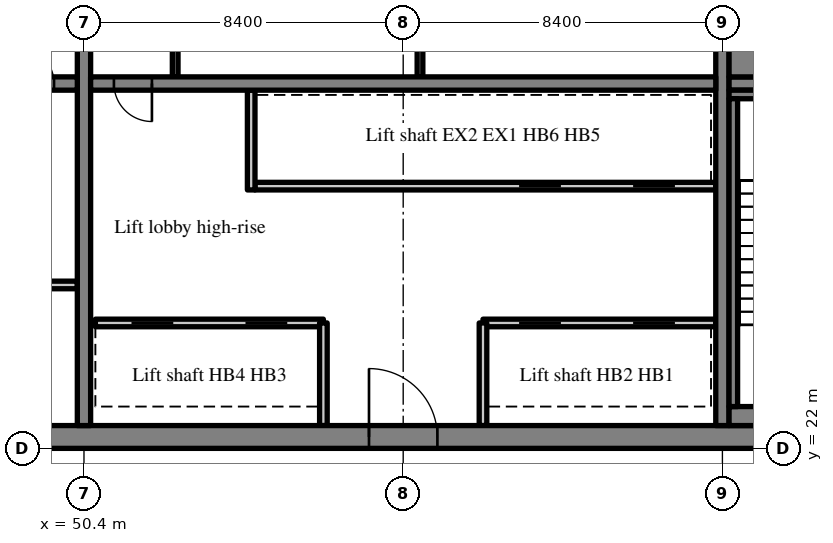
"""IFC4 building model, lengths in metres.
Left out: names, types, materials, properties, quantities, classifications, styles, units other than length and angle.
Written with IfcOpenShell. Run it as: python <this file> out.ifc"""

import sys

from ifc_helpers import new_model, si_unit, direction, frame, frame_2d, origin, place, context, subcontext, project, spatial, rectangle, extrude, source, transform, mapped, element, fill, save


model = new_model("IFC4")
c1 = context("Model", 3, precision=1e-05, world=origin(), true_north=direction((0.0, 1.0)))
c2 = subcontext(c1, "Body", "Model", "MODEL_VIEW")
j1 = project(units=[si_unit("LENGTHUNIT", "METRE"), si_unit("PLANEANGLEUNIT", "RADIAN")], contexts=[c1])
p1 = place(None, origin())
s1 = spatial("IfcSite", under=j1, at=p1, CompositionType="ELEMENT")
p2 = place(p1, origin())
s2 = spatial("IfcBuilding", under=s1, at=p2, CompositionType="ELEMENT")
p3 = place(p2, frame((0.0, 0.0, 249.1)))
s3 = spatial("IfcBuildingStorey", under=s2, at=p3, CompositionType="ELEMENT", Elevation=249.1)
m1 = source(origin(), c2, "Body", "SweptSolid", [
    extrude(rectangle(XDim=50.4, YDim=0.6, at=frame_2d((25.2, 0.0))), origin(), (0.0, 0.0, 1.0), 3.62),
])
p4 = place(p3, frame((25.2, 22.3, 0.0), z_axis=(0.0, 0.0, 1.0), x_axis=(1.0, 0.0, 0.0)))
e1 = element("IfcWall", 1, at=p4, inside=s3, PredefinedType="SHEAR", context=c2, shape_type="MappedRepresentation", body=[
    mapped(m1, transform((0.0, 0.0, 0.0), scale=1.0)),
])
m2 = source(origin(), c2, "Body", "SweptSolid", [
    extrude(rectangle(XDim=1.8, YDim=2.1, at=frame_2d((0.9, 1.05))), frame((0.0, 0.31, 0.0), z_axis=(0.0, -1.0, 0.0), x_axis=(1.0, 0.0, 0.0)), (0.0, 0.0, 1.0), 0.62),
])
p5 = place(p4, frame((15.9, 0.0, 0.0)))
e2 = element("IfcOpeningElement", 2, at=p5, cuts=e1, PredefinedType="OPENING", context=c2, shape_type="MappedRepresentation", body=[
    mapped(m2, transform((0.0, 0.0, 0.0), scale=1.0)),
])
m3 = source(origin(), c2, "Body", "SweptSolid", [
    extrude(rectangle(XDim=0.9, YDim=2.1, at=frame_2d((0.45, 1.05))), frame((0.0, 0.31, 0.0), z_axis=(0.0, -1.0, 0.0), x_axis=(1.0, 0.0, 0.0)), (0.0, 0.0, 1.0), 0.62),
])
p6 = place(p4, frame((21.513, 0.0, 0.0)))
e3 = element("IfcOpeningElement", 3, at=p6, cuts=e1, PredefinedType="OPENING", context=c2, shape_type="MappedRepresentation", body=[
    mapped(m3, transform((0.0, 0.0, 0.0), scale=1.0)),
])
p7 = place(p4, frame((32.7, 0.0, 0.0)))
e4 = element("IfcOpeningElement", 4, at=p7, cuts=e1, PredefinedType="OPENING", context=c2, shape_type="MappedRepresentation", body=[
    mapped(m2, transform((0.0, 0.0, 0.0), scale=1.0)),
])
m4 = source(origin(), c2, "Body", "SweptSolid", [
    extrude(rectangle(XDim=1.2, YDim=2.1, at=frame_2d((0.6, 1.05))), frame((0.0, 0.31, 0.0), z_axis=(0.0, -1.0, 0.0), x_axis=(1.0, 0.0, 0.0)), (0.0, 0.0, 1.0), 0.62),
])
p8 = place(p4, frame((6.488, 0.0, 0.0)))
e5 = element("IfcOpeningElement", 5, at=p8, cuts=e1, PredefinedType="OPENING", context=c2, shape_type="MappedRepresentation", body=[
    mapped(m4, transform((0.0, 0.0, 0.0), scale=1.0)),
])
p9 = place(p4, frame((47.925, 0.0, 0.0)))
e6 = element("IfcOpeningElement", 6, at=p9, cuts=e1, PredefinedType="OPENING", context=c2, shape_type="MappedRepresentation", body=[
    mapped(m4, transform((0.0, 0.0, 0.0), scale=1.0)),
])
m5 = source(origin(), c2, "Body", "SweptSolid", [
    extrude(rectangle(XDim=18.8, YDim=0.35, at=frame_2d((9.4, 0.0))), origin(), (0.0, 0.0, 1.0), 3.62),
])
p10 = place(p3, frame((50.4, 22.6, 0.0), z_axis=(0.0, 0.0, 1.0), x_axis=(0.0, 1.0, 0.0)))
e7 = element("IfcWall", 7, at=p10, inside=s3, PredefinedType="SHEAR", context=c2, shape_type="MappedRepresentation", body=[
    mapped(m5, transform((0.0, 0.0, 0.0), scale=1.0)),
])
m6 = source(origin(), c2, "Body", "SweptSolid", [
    extrude(rectangle(XDim=1.1, YDim=2.1, at=frame_2d((0.55, 1.05))), frame((0.0, 0.185, 0.0), z_axis=(0.0, -1.0, 0.0), x_axis=(1.0, 0.0, 0.0)), (0.0, 0.0, 1.0), 0.37),
])
p11 = place(p10, frame((12.85, 0.0, 0.0)))
e8 = element("IfcOpeningElement", 8, at=p11, cuts=e7, PredefinedType="OPENING", context=c2, shape_type="MappedRepresentation", body=[
    mapped(m6, transform((0.0, 0.0, 0.0), scale=1.0)),
])
p12 = place(p3, frame((67.2, 22.6, 0.0), z_axis=(0.0, 0.0, 1.0), x_axis=(0.0, 1.0, 0.0)))
e9 = element("IfcWall", 9, at=p12, inside=s3, PredefinedType="SHEAR", context=c2, shape_type="MappedRepresentation", body=[
    mapped(m5, transform((0.0, 0.0, 0.0), scale=1.0)),
])
m7 = source(origin(), c2, "Body", "SweptSolid", [
    extrude(rectangle(XDim=16.45, YDim=0.35, at=frame_2d((8.225, 0.0))), origin(), (0.0, 0.0, 1.0), 3.62),
])
p13 = place(p3, frame((33.775, 31.6, 0.0), z_axis=(0.0, 0.0, 1.0), x_axis=(1.0, 0.0, 0.0)))
e10 = element("IfcWall", 10, at=p13, inside=s3, PredefinedType="SHEAR", context=c2, shape_type="MappedRepresentation", body=[
    mapped(m7, transform((0.0, 0.0, 0.0), scale=1.0)),
])
m8 = source(origin(), c2, "Body", "SweptSolid", [
    extrude(rectangle(XDim=1.0, YDim=2.1, at=frame_2d((0.5, 1.05))), frame((0.0, 0.185, 0.0), z_axis=(0.0, -1.0, 0.0), x_axis=(1.0, 0.0, 0.0)), (0.0, 0.0, 1.0), 0.37),
])
p14 = place(p13, frame((14.837, 0.0, 0.0)))
e11 = element("IfcOpeningElement", 11, at=p14, cuts=e10, PredefinedType="OPENING", context=c2, shape_type="MappedRepresentation", body=[
    mapped(m8, transform((0.0, 0.0, 0.0), scale=1.0)),
])
m9 = source(origin(), c2, "Body", "SweptSolid", [
    extrude(rectangle(XDim=16.45, YDim=0.35, at=frame_2d((8.225, 0.0))), origin(), (0.0, 0.0, 1.0), 3.62),
])
p15 = place(p3, frame((50.575, 31.6, 0.0), z_axis=(0.0, 0.0, 1.0), x_axis=(1.0, 0.0, 0.0)))
e12 = element("IfcWall", 12, at=p15, inside=s3, PredefinedType="SHEAR", context=c2, shape_type="MappedRepresentation", body=[
    mapped(m9, transform((0.0, 0.0, 0.0), scale=1.0)),
])
p16 = place(p15, frame((0.613, 0.0, 0.0)))
e13 = element("IfcOpeningElement", 13, at=p16, cuts=e12, PredefinedType="OPENING", context=c2, shape_type="MappedRepresentation", body=[
    mapped(m8, transform((0.0, 0.0, 0.0), scale=1.0)),
])
m10 = source(origin(), c2, "Body", "SweptSolid", [
    extrude(rectangle(XDim=7.625, YDim=0.35, at=frame_2d((3.812, 0.0))), origin(), (0.0, 0.0, 1.0), 3.62),
])
p17 = place(p3, frame((67.375, 31.6, 0.0), z_axis=(0.0, 0.0, 1.0), x_axis=(1.0, 0.0, 0.0)))
e14 = element("IfcWall", 14, at=p17, inside=s3, PredefinedType="SHEAR", context=c2, shape_type="MappedRepresentation", body=[
    mapped(m10, transform((0.0, 0.0, 0.0), scale=1.0)),
])
p18 = place(p17, frame((5.8, 0.0, 0.0)))
e15 = element("IfcOpeningElement", 15, at=p18, cuts=e14, PredefinedType="OPENING", context=c2, shape_type="MappedRepresentation", body=[
    mapped(m6, transform((0.0, 0.0, 0.0), scale=1.0)),
])
m11 = source(origin(), c2, "Body", "SweptSolid", [
    extrude(rectangle(XDim=6.125, YDim=0.2, at=frame_2d((3.062, 0.0))), origin(), (0.0, 0.0, 1.0), 3.62),
])
p19 = place(p3, frame((44.1, 26.3, 0.0), z_axis=(0.0, 0.0, 1.0), x_axis=(1.0, 0.0, 0.0)))
e16 = element("IfcWall", 16, at=p19, inside=s3, PredefinedType="PARTITIONING", context=c2, shape_type="MappedRepresentation", body=[
    mapped(m11, transform((0.0, 0.0, 0.0), scale=1.0)),
])
p20 = place(p3, frame((67.025, 25.3, 0.0), z_axis=(0.0, 0.0, 1.0), x_axis=(-1.0, 0.0, 0.0)))
e17 = element("IfcWall", 17, at=p20, inside=s3, PredefinedType="SOLIDWALL", context=c2, shape_type="MappedRepresentation", body=[
    mapped(m11, transform((0.0, 0.0, 0.0), scale=1.0)),
])
m12 = source(origin(), c2, "Body", "SweptSolid", [
    extrude(rectangle(XDim=1.1, YDim=2.1, at=frame_2d((0.55, 1.05))), frame((0.0, 0.11, 0.0), z_axis=(0.0, -1.0, 0.0), x_axis=(1.0, 0.0, 0.0)), (0.0, 0.0, 1.0), 0.22),
])
p21 = place(p20, frame((1.075, 0.0, 0.0)))
e18 = element("IfcOpeningElement", 18, at=p21, cuts=e17, PredefinedType="OPENING", context=c2, shape_type="MappedRepresentation", body=[
    mapped(m12, transform((0.0, 0.0, 0.0), scale=1.0)),
])
p22 = place(p20, frame((4.075, 0.0, 0.0)))
e19 = element("IfcOpeningElement", 19, at=p22, cuts=e17, PredefinedType="OPENING", context=c2, shape_type="MappedRepresentation", body=[
    mapped(m12, transform((0.0, 0.0, 0.0), scale=1.0)),
])
m13 = source(origin(), c2, "Body", "SweptSolid", [
    extrude(rectangle(XDim=6.0, YDim=0.2, at=frame_2d((3.0, 0.0))), origin(), (0.0, 0.0, 1.0), 3.62),
])
p23 = place(p3, frame((56.7, 25.3, 0.0), z_axis=(0.0, 0.0, 1.0), x_axis=(-1.0, 0.0, 0.0)))
e20 = element("IfcWall", 20, at=p23, inside=s3, PredefinedType="SOLIDWALL", context=c2, shape_type="MappedRepresentation", body=[
    mapped(m13, transform((0.0, 0.0, 0.0), scale=1.0)),
])
p24 = place(p23, frame((0.95, 0.0, 0.0)))
e21 = element("IfcOpeningElement", 21, at=p24, cuts=e20, PredefinedType="OPENING", context=c2, shape_type="MappedRepresentation", body=[
    mapped(m12, transform((0.0, 0.0, 0.0), scale=1.0)),
])
p25 = place(p23, frame((3.95, 0.0, 0.0)))
e22 = element("IfcOpeningElement", 22, at=p25, cuts=e20, PredefinedType="OPENING", context=c2, shape_type="MappedRepresentation", body=[
    mapped(m12, transform((0.0, 0.0, 0.0), scale=1.0)),
])
m14 = source(origin(), c2, "Body", "SweptSolid", [
    extrude(rectangle(XDim=12.125, YDim=0.2, at=frame_2d((6.062, 0.0))), origin(), (0.0, 0.0, 1.0), 3.62),
])
p26 = place(p3, frame((67.025, 28.9, 0.0), z_axis=(0.0, 0.0, 1.0), x_axis=(-1.0, 0.0, 0.0)))
e23 = element("IfcWall", 23, at=p26, inside=s3, PredefinedType="SOLIDWALL", context=c2, shape_type="MappedRepresentation", body=[
    mapped(m14, transform((0.0, 0.0, 0.0), scale=1.0)),
])
p27 = place(p26, frame((1.075, 0.0, 0.0)))
e24 = element("IfcOpeningElement", 24, at=p27, cuts=e23, PredefinedType="OPENING", context=c2, shape_type="MappedRepresentation", body=[
    mapped(m12, transform((0.0, 0.0, 0.0), scale=1.0)),
])
p28 = place(p26, frame((4.075, 0.0, 0.0)))
e25 = element("IfcOpeningElement", 25, at=p28, cuts=e23, PredefinedType="OPENING", context=c2, shape_type="MappedRepresentation", body=[
    mapped(m12, transform((0.0, 0.0, 0.0), scale=1.0)),
])
m15 = source(origin(), c2, "Body", "SweptSolid", [
    extrude(rectangle(XDim=2.7, YDim=0.2, at=frame_2d((1.35, 0.0))), origin(), (0.0, 0.0, 1.0), 3.62),
])
for number, where, z_axis, x_axis in (
    (26, (60.9, 22.6, 0.0), (0.0, 0.0, 1.0), (0.0, 1.0, 0.0)),
    (27, (56.7, 22.6, 0.0), (0.0, 0.0, 1.0), (0.0, 1.0, 0.0)),
):
    element("IfcWall", number, at=place(p3, frame(where, z_axis=z_axis, x_axis=x_axis)), inside=s3, PredefinedType="SOLIDWALL", context=c2, shape_type="MappedRepresentation", body=[
        mapped(m15, transform((0.0, 0.0, 0.0), scale=1.0)),
    ])
m16 = source(origin(), c2, "Body", "SweptSolid", [
    extrude(rectangle(XDim=2.625, YDim=0.2, at=frame_2d((1.312, 0.0))), origin(), (0.0, 0.0, 1.0), 3.62),
])
p29 = place(p3, frame((54.8, 28.8, 0.0), z_axis=(0.0, 0.0, 1.0), x_axis=(0.0, 1.0, 0.0)))
e28 = element("IfcWall", 28, at=p29, inside=s3, PredefinedType="SOLIDWALL", context=c2, shape_type="MappedRepresentation", body=[
    mapped(m16, transform((0.0, 0.0, 0.0), scale=1.0)),
])
m17 = source(origin(), c2, "Body", "SweptSolid", [
    extrude(rectangle(XDim=3.225, YDim=0.15, at=frame_2d((1.613, 0.0))), origin(), (0.0, 0.0, 1.0), 3.62),
])
for number, where, z_axis, x_axis in (
    (29, (52.8, 31.775, 0.0), (0.0, 0.0, 1.0), (0.0, 1.0, 0.0)),
    (30, (59.242, 31.775, 0.0), (0.0, 0.0, 1.0), (0.0, 1.0, 0.0)),
):
    element("IfcWall", number, at=place(p3, frame(where, z_axis=z_axis, x_axis=x_axis)), inside=s3, PredefinedType="PARTITIONING", context=c2, shape_type="MappedRepresentation", body=[
        mapped(m17, transform((0.0, 0.0, 0.0), scale=1.0)),
    ])
m18 = source(origin(), c2, "Body", "SweptSolid", [
    extrude(rectangle(XDim=4.875, YDim=0.5, at=frame_2d((2.438, 0.0))), origin(), (0.0, 0.0, 1.0), 3.62),
])
p30 = place(p3, frame((67.375, 22.85, 0.0), z_axis=(0.0, 0.0, 1.0), x_axis=(1.0, 0.0, 0.0)))
e31 = element("IfcWall", 31, at=p30, inside=s3, PredefinedType="SOLIDWALL", context=c2, shape_type="MappedRepresentation", body=[
    mapped(m18, transform((0.0, 0.0, 0.0), scale=1.0)),
])
m19 = source(origin(), c2, "Body", "SweptSolid", [
    extrude(rectangle(XDim=4.875, YDim=0.225, at=frame_2d((2.438, 0.0))), origin(), (0.0, 0.0, 1.0), 3.62),
])
p31 = place(p3, frame((67.375, 31.312, 0.0), z_axis=(0.0, 0.0, 1.0), x_axis=(1.0, 0.0, 0.0)))
e32 = element("IfcWall", 32, at=p31, inside=s3, PredefinedType="SOLIDWALL", context=c2, shape_type="MappedRepresentation", body=[
    mapped(m19, transform((0.0, 0.0, 0.0), scale=1.0)),
])
m20 = source(origin(), c2, "Body", "SweptSolid", [
    extrude(rectangle(XDim=8.1, YDim=0.225, at=frame_2d((4.05, 0.0))), origin(), (0.0, 0.0, 1.0), 3.62),
])
p32 = place(p3, frame((67.487, 23.1, 0.0), z_axis=(0.0, 0.0, 1.0), x_axis=(0.0, 1.0, 0.0)))
e33 = element("IfcWall", 33, at=p32, inside=s3, PredefinedType="SOLIDWALL", context=c2, shape_type="MappedRepresentation", body=[
    mapped(m20, transform((0.0, 0.0, 0.0), scale=1.0)),
])
m21 = source(origin(), c2, "Body", "SweptSolid", [
    extrude(rectangle(XDim=4.875, YDim=1.025, at=frame_2d((2.438, 0.0))), origin(), (0.0, 0.0, 1.0), 3.62),
])
p33 = place(p3, frame((67.375, 32.287, 0.0), z_axis=(0.0, 0.0, 1.0), x_axis=(1.0, 0.0, 0.0)))
e34 = element("IfcWall", 34, at=p33, inside=s3, PredefinedType="SOLIDWALL", context=c2, shape_type="MappedRepresentation", body=[
    mapped(m21, transform((0.0, 0.0, 0.0), scale=1.0)),
])
m22 = source(origin(), c2, "Body", "SweptSolid", [
    extrude(rectangle(XDim=1.0, YDim=2.1, at=frame_2d((0.5, 1.05))), frame((0.0, 0.025, 0.0), z_axis=(0.0, -1.0, 0.0), x_axis=(1.0, 0.0, 0.0)), (0.0, 0.0, 1.0), 0.05),
])
p34 = place(p14, origin())
e35 = element("IfcDoor", 35, at=p34, inside=s3, OperationType="SINGLE_SWING_LEFT", PredefinedType="DOOR", context=c2, shape_type="MappedRepresentation", body=[
    mapped(m22, transform((0.0, 0.0, 0.0), scale=1.0)),
])
fill(e11, e35)
m23 = source(origin(), c2, "Body", "SweptSolid", [
    extrude(rectangle(XDim=1.8, YDim=2.1, at=frame_2d((0.9, 1.05))), frame((0.0, 0.225, 0.0), z_axis=(0.0, -1.0, 0.0), x_axis=(1.0, 0.0, 0.0)), (0.0, 0.0, 1.0), 0.05),
])
p35 = place(p7, origin())
e36 = element("IfcDoor", 36, at=p35, inside=s3, OperationType="DOUBLE_DOOR_SINGLE_SWING", PredefinedType="DOOR", context=c2, shape_type="MappedRepresentation", body=[
    mapped(m23, transform((0.0, 0.0, 0.0), scale=1.0)),
])
fill(e4, e36)
p36 = place(p16, origin())
e37 = element("IfcDoor", 37, at=p36, inside=s3, OperationType="SINGLE_SWING_RIGHT", PredefinedType="DOOR", context=c2, shape_type="MappedRepresentation", body=[
    mapped(m22, transform((0.0, 0.0, 0.0), scale=1.0)),
])
fill(e13, e37)
m24 = source(origin(), c2, "Body", "SweptSolid", [
    extrude(rectangle(XDim=1.1, YDim=2.1, at=frame_2d((0.55, 1.05))), frame((0.0, 0.025, 0.0), z_axis=(0.0, -1.0, 0.0), x_axis=(1.0, 0.0, 0.0)), (0.0, 0.0, 1.0), 0.05),
])
p37 = place(p21, origin())
e38 = element("IfcDoor", 38, at=p37, inside=s3, OperationType="SLIDING_TO_RIGHT", PredefinedType="DOOR", context=c2, shape_type="MappedRepresentation", body=[
    mapped(m24, transform((0.0, 0.0, 0.0), scale=1.0)),
])
fill(e18, e38)
p38 = place(p22, origin())
e39 = element("IfcDoor", 39, at=p38, inside=s3, OperationType="SLIDING_TO_LEFT", PredefinedType="DOOR", context=c2, shape_type="MappedRepresentation", body=[
    mapped(m24, transform((0.0, 0.0, 0.0), scale=1.0)),
])
fill(e19, e39)
p39 = place(p24, origin())
e40 = element("IfcDoor", 40, at=p39, inside=s3, OperationType="SLIDING_TO_RIGHT", PredefinedType="DOOR", context=c2, shape_type="MappedRepresentation", body=[
    mapped(m24, transform((0.0, 0.0, 0.0), scale=1.0)),
])
fill(e21, e40)
p40 = place(p25, origin())
e41 = element("IfcDoor", 41, at=p40, inside=s3, OperationType="SLIDING_TO_LEFT", PredefinedType="DOOR", context=c2, shape_type="MappedRepresentation", body=[
    mapped(m24, transform((0.0, 0.0, 0.0), scale=1.0)),
])
fill(e22, e41)
p41 = place(p27, origin())
e42 = element("IfcDoor", 42, at=p41, inside=s3, OperationType="SLIDING_TO_RIGHT", PredefinedType="DOOR", context=c2, shape_type="MappedRepresentation", body=[
    mapped(m24, transform((0.0, 0.0, 0.0), scale=1.0)),
])
fill(e24, e42)
p42 = place(p28, origin())
e43 = element("IfcDoor", 43, at=p42, inside=s3, OperationType="SLIDING_TO_LEFT", PredefinedType="DOOR", context=c2, shape_type="MappedRepresentation", body=[
    mapped(m24, transform((0.0, 0.0, 0.0), scale=1.0)),
])
fill(e25, e43)
save(model, sys.argv[1])
